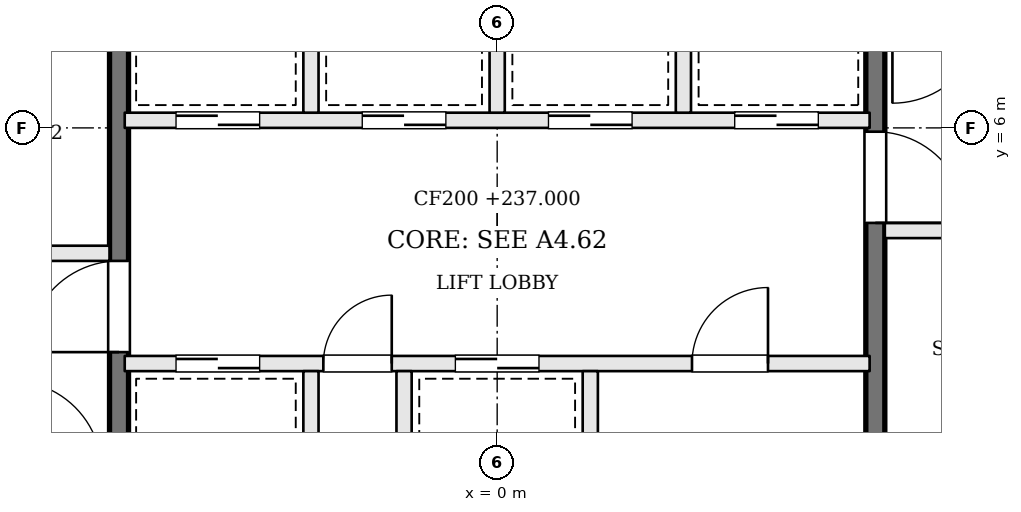
"""IFC4 building model, lengths in metres.
Left out: names, types, materials, properties, quantities, classifications, styles, units other than length and angle.
Written with IfcOpenShell. Run it as: python <this file> out.ifc"""

import sys

from ifc_helpers import new_model, si_unit, direction, frame, frame_2d, origin, place, context, subcontext, project, spatial, rectangle, extrude, element, fill, save


model = new_model("IFC4")
c1 = context("Model", 3, precision=1e-05, world=origin(), true_north=direction((0.0, 1.0)))
c2 = subcontext(c1, "Body", "Model", "MODEL_VIEW")
j1 = project(units=[si_unit("LENGTHUNIT", "METRE"), si_unit("PLANEANGLEUNIT", "RADIAN")], contexts=[c1])
p1 = place(None, origin())
s1 = spatial("IfcSite", under=j1, at=p1, CompositionType="ELEMENT")
p2 = place(p1, origin())
s2 = spatial("IfcBuilding", under=s1, at=p2, CompositionType="ELEMENT")
p3 = place(p2, frame((0.0, 0.0, 237.0)))
s3 = spatial("IfcBuildingStorey", under=s2, at=p3, CompositionType="ELEMENT", Elevation=237.0)
p4 = place(p3, frame((-12.2, 4.35, 0.0), z_axis=(0.0, 0.0, 1.0), x_axis=(1.0, 0.0, 0.0)))
e1 = element("IfcWall", 1, at=p4, inside=s3, PredefinedType="SOLIDWALL", context=c2, shape_type="SweptSolid", body=[
    extrude(rectangle(XDim=7.1, YDim=0.2, at=frame_2d((3.55, 0.0))), origin(), (0.0, 0.0, 1.0), 3.7),
])
p5 = place(p4, frame((4.4, 0.0, 0.0)))
e2 = element("IfcOpeningElement", 2, at=p5, cuts=e1, PredefinedType="OPENING", context=c2, shape_type="SweptSolid", body=[
    extrude(rectangle(XDim=1.2, YDim=2.1, at=frame_2d((0.6, 1.05))), frame((0.0, 0.11, 0.0), z_axis=(0.0, -1.0, 0.0), x_axis=(1.0, 0.0, 0.0)), (0.0, 0.0, 1.0), 0.22),
])
p6 = place(p4, frame((1.1, 0.0, 0.0)))
e3 = element("IfcOpeningElement", 3, at=p6, cuts=e1, PredefinedType="OPENING", context=c2, shape_type="SweptSolid", body=[
    extrude(rectangle(XDim=1.2, YDim=2.1, at=frame_2d((0.6, 1.05))), frame((0.0, 0.11, 0.0), z_axis=(0.0, -1.0, 0.0), x_axis=(1.0, 0.0, 0.0)), (0.0, 0.0, 1.0), 0.22),
])
p7 = place(p3, frame((12.2, 4.65, 0.0), z_axis=(0.0, 0.0, 1.0), x_axis=(-1.0, 0.0, 0.0)))
e4 = element("IfcWall", 4, at=p7, inside=s3, PredefinedType="SOLIDWALL", context=c2, shape_type="SweptSolid", body=[
    extrude(rectangle(XDim=7.1, YDim=0.2, at=frame_2d((3.55, 0.0))), origin(), (0.0, 0.0, 1.0), 3.7),
])
p8 = place(p7, frame((4.4, 0.0, 0.0)))
e5 = element("IfcOpeningElement", 5, at=p8, cuts=e4, PredefinedType="OPENING", context=c2, shape_type="SweptSolid", body=[
    extrude(rectangle(XDim=1.2, YDim=2.1, at=frame_2d((0.6, 1.05))), frame((0.0, 0.11, 0.0), z_axis=(0.0, -1.0, 0.0), x_axis=(1.0, 0.0, 0.0)), (0.0, 0.0, 1.0), 0.22),
])
p9 = place(p7, frame((1.1, 0.0, 0.0)))
e6 = element("IfcOpeningElement", 6, at=p9, cuts=e4, PredefinedType="OPENING", context=c2, shape_type="SweptSolid", body=[
    extrude(rectangle(XDim=1.2, YDim=2.1, at=frame_2d((0.6, 1.05))), frame((0.0, 0.11, 0.0), z_axis=(0.0, -1.0, 0.0), x_axis=(1.0, 0.0, 0.0)), (0.0, 0.0, 1.0), 0.22),
])
p10 = place(p3, frame((-4.975, -2.2, 0.0), z_axis=(0.0, 0.0, 1.0), x_axis=(0.0, 1.0, 0.0)))
e7 = element("IfcWall", 7, at=p10, inside=s3, PredefinedType="SOLIDWALL", context=c2, shape_type="SweptSolid", body=[
    extrude(rectangle(XDim=13.4, YDim=0.25, at=frame_2d((6.7, 0.0))), origin(), (0.0, 0.0, 1.0), 3.7),
])
p11 = place(p10, frame((5.25, 0.0, 0.0)))
e8 = element("IfcOpeningElement", 8, at=p11, cuts=e7, PredefinedType="OPENING", context=c2, shape_type="SweptSolid", body=[
    extrude(rectangle(XDim=1.2, YDim=2.1, at=frame_2d((0.6, 1.05))), frame((0.0, 0.135, 0.0), z_axis=(0.0, -1.0, 0.0), x_axis=(1.0, 0.0, 0.0)), (0.0, 0.0, 1.0), 0.27),
])
p12 = place(p3, frame((4.975, 11.2, 0.0), z_axis=(0.0, 0.0, 1.0), x_axis=(0.0, -1.0, 0.0)))
e9 = element("IfcWall", 9, at=p12, inside=s3, PredefinedType="SOLIDWALL", context=c2, shape_type="SweptSolid", body=[
    extrude(rectangle(XDim=13.4, YDim=0.25, at=frame_2d((6.7, 0.0))), origin(), (0.0, 0.0, 1.0), 3.7),
])
p13 = place(p12, frame((5.25, 0.0, 0.0)))
e10 = element("IfcOpeningElement", 10, at=p13, cuts=e9, PredefinedType="OPENING", context=c2, shape_type="SweptSolid", body=[
    extrude(rectangle(XDim=1.2, YDim=2.1, at=frame_2d((0.6, 1.05))), frame((0.0, 0.135, 0.0), z_axis=(0.0, -1.0, 0.0), x_axis=(1.0, 0.0, 0.0)), (0.0, 0.0, 1.0), 0.27),
])
p14 = place(p3, frame((-4.9, 2.9, 0.0), z_axis=(0.0, 0.0, 1.0), x_axis=(1.0, 0.0, 0.0)))
e11 = element("IfcWall", 11, at=p14, inside=s3, PredefinedType="SOLIDWALL", context=c2, shape_type="SweptSolid", body=[
    extrude(rectangle(XDim=9.8, YDim=0.2, at=frame_2d((4.9, 0.0))), origin(), (0.0, 0.0, 1.0), 3.7),
])
p15 = place(p14, frame((0.675, 0.0, 0.0)))
e12 = element("IfcOpeningElement", 12, at=p15, cuts=e11, PredefinedType="OPENING", context=c2, shape_type="SweptSolid", body=[
    extrude(rectangle(XDim=1.1, YDim=2.1, at=frame_2d((0.55, 1.05))), frame((0.0, 0.11, 0.0), z_axis=(0.0, -1.0, 0.0), x_axis=(1.0, 0.0, 0.0)), (0.0, 0.0, 1.0), 0.22),
])
p16 = place(p14, frame((2.613, 0.0, 0.0)))
e13 = element("IfcOpeningElement", 13, at=p16, cuts=e11, PredefinedType="OPENING", context=c2, shape_type="SweptSolid", body=[
    extrude(rectangle(XDim=0.9, YDim=2.1, at=frame_2d((0.45, 1.05))), frame((0.0, 0.11, 0.0), z_axis=(0.0, -1.0, 0.0), x_axis=(1.0, 0.0, 0.0)), (0.0, 0.0, 1.0), 0.22),
])
p17 = place(p14, frame((4.35, 0.0, 0.0)))
e14 = element("IfcOpeningElement", 14, at=p17, cuts=e11, PredefinedType="OPENING", context=c2, shape_type="SweptSolid", body=[
    extrude(rectangle(XDim=1.1, YDim=2.1, at=frame_2d((0.55, 1.05))), frame((0.0, 0.11, 0.0), z_axis=(0.0, -1.0, 0.0), x_axis=(1.0, 0.0, 0.0)), (0.0, 0.0, 1.0), 0.22),
])
p18 = place(p14, frame((7.463, 0.0, 0.0)))
e15 = element("IfcOpeningElement", 15, at=p18, cuts=e11, PredefinedType="OPENING", context=c2, shape_type="SweptSolid", body=[
    extrude(rectangle(XDim=1.0, YDim=2.1, at=frame_2d((0.5, 1.05))), frame((0.0, 0.11, 0.0), z_axis=(0.0, -1.0, 0.0), x_axis=(1.0, 0.0, 0.0)), (0.0, 0.0, 1.0), 0.22),
])
p19 = place(p3, frame((-4.9, 6.1, 0.0), z_axis=(0.0, 0.0, 1.0), x_axis=(1.0, 0.0, 0.0)))
e16 = element("IfcWall", 16, at=p19, inside=s3, PredefinedType="SOLIDWALL", context=c2, shape_type="SweptSolid", body=[
    extrude(rectangle(XDim=9.8, YDim=0.2, at=frame_2d((4.9, 0.0))), origin(), (0.0, 0.0, 1.0), 3.7),
])
p20 = place(p19, frame((0.675, 0.0, 0.0)))
e17 = element("IfcOpeningElement", 17, at=p20, cuts=e16, PredefinedType="OPENING", context=c2, shape_type="SweptSolid", body=[
    extrude(rectangle(XDim=1.1, YDim=2.1, at=frame_2d((0.55, 1.05))), frame((0.0, 0.11, 0.0), z_axis=(0.0, -1.0, 0.0), x_axis=(1.0, 0.0, 0.0)), (0.0, 0.0, 1.0), 0.22),
])
p21 = place(p19, frame((3.125, 0.0, 0.0)))
e18 = element("IfcOpeningElement", 18, at=p21, cuts=e16, PredefinedType="OPENING", context=c2, shape_type="SweptSolid", body=[
    extrude(rectangle(XDim=1.1, YDim=2.1, at=frame_2d((0.55, 1.05))), frame((0.0, 0.11, 0.0), z_axis=(0.0, -1.0, 0.0), x_axis=(1.0, 0.0, 0.0)), (0.0, 0.0, 1.0), 0.22),
])
p22 = place(p19, frame((5.575, 0.0, 0.0)))
e19 = element("IfcOpeningElement", 19, at=p22, cuts=e16, PredefinedType="OPENING", context=c2, shape_type="SweptSolid", body=[
    extrude(rectangle(XDim=1.1, YDim=2.1, at=frame_2d((0.55, 1.05))), frame((0.0, 0.11, 0.0), z_axis=(0.0, -1.0, 0.0), x_axis=(1.0, 0.0, 0.0)), (0.0, 0.0, 1.0), 0.22),
])
p23 = place(p19, frame((8.025, 0.0, 0.0)))
e20 = element("IfcOpeningElement", 20, at=p23, cuts=e16, PredefinedType="OPENING", context=c2, shape_type="SweptSolid", body=[
    extrude(rectangle(XDim=1.1, YDim=2.1, at=frame_2d((0.55, 1.05))), frame((0.0, 0.11, 0.0), z_axis=(0.0, -1.0, 0.0), x_axis=(1.0, 0.0, 0.0)), (0.0, 0.0, 1.0), 0.22),
])
for number, where, z_axis, x_axis in (
    (21, (-2.45, 0.6, 0.0), (0.0, 0.0, 1.0), (0.0, 1.0, 0.0)),
    (22, (-1.225, 0.6, 0.0), (0.0, 0.0, 1.0), (0.0, 1.0, 0.0)),
    (23, (1.225, 0.6, 0.0), (0.0, 0.0, 1.0), (0.0, 1.0, 0.0)),
    (24, (-2.45, 6.2, 0.0), (0.0, 0.0, 1.0), (0.0, 1.0, 0.0)),
    (25, (0.0, 6.2, 0.0), (0.0, 0.0, 1.0), (0.0, 1.0, 0.0)),
    (26, (2.45, 6.2, 0.0), (0.0, 0.0, 1.0), (0.0, 1.0, 0.0)),
):
    element("IfcWall", number, at=place(p3, frame(where, z_axis=z_axis, x_axis=x_axis)), inside=s3, PredefinedType="SOLIDWALL", context=c2, shape_type="SweptSolid", body=[
        extrude(rectangle(XDim=2.2, YDim=0.2, at=frame_2d((1.1, 0.0))), origin(), (0.0, 0.0, 1.0), 3.7),
    ])
p24 = place(p11, origin())
e27 = element("IfcDoor", 27, at=p24, inside=s3, OperationType="SINGLE_SWING_LEFT", PredefinedType="DOOR", context=c2, shape_type="SweptSolid", body=[
    extrude(rectangle(XDim=1.2, YDim=2.1, at=frame_2d((0.6, 1.05))), frame((0.0, 0.025, 0.0), z_axis=(0.0, -1.0, 0.0), x_axis=(1.0, 0.0, 0.0)), (0.0, 0.0, 1.0), 0.05),
])
fill(e8, e27)
p25 = place(p13, origin())
e28 = element("IfcDoor", 28, at=p25, inside=s3, OperationType="SINGLE_SWING_RIGHT", PredefinedType="DOOR", context=c2, shape_type="SweptSolid", body=[
    extrude(rectangle(XDim=1.2, YDim=2.1, at=frame_2d((0.6, 1.05))), frame((0.0, 0.025, 0.0), z_axis=(0.0, -1.0, 0.0), x_axis=(1.0, 0.0, 0.0)), (0.0, 0.0, 1.0), 0.05),
])
fill(e10, e28)
p26 = place(p15, origin())
e29 = element("IfcDoor", 29, at=p26, inside=s3, OperationType="SLIDING_TO_RIGHT", PredefinedType="DOOR", context=c2, shape_type="SweptSolid", body=[
    extrude(rectangle(XDim=1.1, YDim=2.1, at=frame_2d((0.55, 1.05))), frame((0.0, 0.025, 0.0), z_axis=(0.0, -1.0, 0.0), x_axis=(1.0, 0.0, 0.0)), (0.0, 0.0, 1.0), 0.05),
])
fill(e12, e29)
p27 = place(p16, origin())
e30 = element("IfcDoor", 30, at=p27, inside=s3, OperationType="SINGLE_SWING_RIGHT", PredefinedType="DOOR", context=c2, shape_type="SweptSolid", body=[
    extrude(rectangle(XDim=0.9, YDim=2.1, at=frame_2d((0.45, 1.05))), frame((0.0, 0.025, 0.0), z_axis=(0.0, -1.0, 0.0), x_axis=(1.0, 0.0, 0.0)), (0.0, 0.0, 1.0), 0.05),
])
fill(e13, e30)
p28 = place(p17, origin())
e31 = element("IfcDoor", 31, at=p28, inside=s3, OperationType="SLIDING_TO_LEFT", PredefinedType="DOOR", context=c2, shape_type="SweptSolid", body=[
    extrude(rectangle(XDim=1.1, YDim=2.1, at=frame_2d((0.55, 1.05))), frame((0.0, 0.025, 0.0), z_axis=(0.0, -1.0, 0.0), x_axis=(1.0, 0.0, 0.0)), (0.0, 0.0, 1.0), 0.05),
])
fill(e14, e31)
p29 = place(p18, origin())
e32 = element("IfcDoor", 32, at=p29, inside=s3, OperationType="SINGLE_SWING_RIGHT", PredefinedType="DOOR", context=c2, shape_type="SweptSolid", body=[
    extrude(rectangle(XDim=1.0, YDim=2.1, at=frame_2d((0.5, 1.05))), frame((0.0, 0.025, 0.0), z_axis=(0.0, -1.0, 0.0), x_axis=(1.0, 0.0, 0.0)), (0.0, 0.0, 1.0), 0.05),
])
fill(e15, e32)
p30 = place(p20, origin())
e33 = element("IfcDoor", 33, at=p30, inside=s3, OperationType="SLIDING_TO_RIGHT", PredefinedType="DOOR", context=c2, shape_type="SweptSolid", body=[
    extrude(rectangle(XDim=1.1, YDim=2.1, at=frame_2d((0.55, 1.05))), frame((0.0, 0.025, 0.0), z_axis=(0.0, -1.0, 0.0), x_axis=(1.0, 0.0, 0.0)), (0.0, 0.0, 1.0), 0.05),
])
fill(e17, e33)
p31 = place(p21, origin())
e34 = element("IfcDoor", 34, at=p31, inside=s3, OperationType="SLIDING_TO_LEFT", PredefinedType="DOOR", context=c2, shape_type="SweptSolid", body=[
    extrude(rectangle(XDim=1.1, YDim=2.1, at=frame_2d((0.55, 1.05))), frame((0.0, 0.025, 0.0), z_axis=(0.0, -1.0, 0.0), x_axis=(1.0, 0.0, 0.0)), (0.0, 0.0, 1.0), 0.05),
])
fill(e18, e34)
p32 = place(p22, origin())
e35 = element("IfcDoor", 35, at=p32, inside=s3, OperationType="SLIDING_TO_RIGHT", PredefinedType="DOOR", context=c2, shape_type="SweptSolid", body=[
    extrude(rectangle(XDim=1.1, YDim=2.1, at=frame_2d((0.55, 1.05))), frame((0.0, 0.025, 0.0), z_axis=(0.0, -1.0, 0.0), x_axis=(1.0, 0.0, 0.0)), (0.0, 0.0, 1.0), 0.05),
])
fill(e19, e35)
p33 = place(p23, origin())
e36 = element("IfcDoor", 36, at=p33, inside=s3, OperationType="SLIDING_TO_LEFT", PredefinedType="DOOR", context=c2, shape_type="SweptSolid", body=[
    extrude(rectangle(XDim=1.1, YDim=2.1, at=frame_2d((0.55, 1.05))), frame((0.0, 0.025, 0.0), z_axis=(0.0, -1.0, 0.0), x_axis=(1.0, 0.0, 0.0)), (0.0, 0.0, 1.0), 0.05),
])
fill(e20, e36)
save(model, sys.argv[1])
